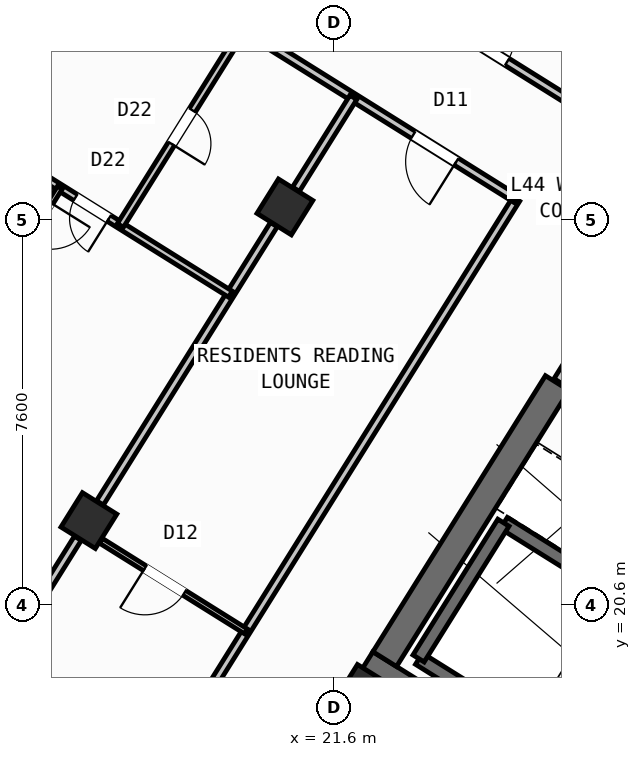
"""IFC4 building model, lengths in metres.
Left out: names, types, materials, properties, quantities, classifications, styles, units other than length and angle.
Written with IfcOpenShell. Run it as: python <this file> out.ifc"""

import sys

from ifc_helpers import new_model, si_unit, direction, frame, frame_2d, origin, origin_2d, place, context, subcontext, project, spatial, rectangle, hollow_rectangle, extrude, source, transform, mapped, element, fill, save


model = new_model("IFC4")
c1 = context("Model", 3, precision=1e-05, world=origin(), true_north=direction((0.0, 1.0)))
c2 = subcontext(c1, "Body", "Model", "MODEL_VIEW")
j1 = project(units=[si_unit("LENGTHUNIT", "METRE"), si_unit("PLANEANGLEUNIT", "RADIAN")], contexts=[c1])
p1 = place(None, origin())
s1 = spatial("IfcSite", under=j1, at=p1, CompositionType="ELEMENT")
p2 = place(p1, origin())
s2 = spatial("IfcBuilding", under=s1, at=p2, CompositionType="ELEMENT")
p3 = place(p2, frame((0.0, 0.0, 174.9)))
s3 = spatial("IfcBuildingStorey", under=s2, at=p3, CompositionType="ELEMENT", Elevation=174.9)
p4 = place(p3, frame((33.366, 12.477, 0.0), z_axis=(0.0, 0.0, 1.0), x_axis=(-0.848047359947, 0.529920442413, 0.0)))
e1 = element("IfcWall", 1, at=p4, inside=s3, PredefinedType="SHEAR", context=c2, shape_type="SweptSolid", body=[
    extrude(rectangle(XDim=13.14, YDim=0.55, at=frame_2d((6.57, 0.0))), origin(), (0.0, 0.0, 1.0), 4.22),
])
p5 = place(p3, frame((26.007, 24.976, 0.0), z_axis=(0.0, 0.0, 1.0), x_axis=(-0.529923795287, -0.848045264823, 0.0)))
e2 = element("IfcWall", 2, at=p5, inside=s3, PredefinedType="SHEAR", context=c2, shape_type="SweptSolid", body=[
    extrude(rectangle(XDim=6.425, YDim=0.55, at=frame_2d((3.212, 0.0))), origin(), (0.0, 0.0, 1.0), 4.22),
])
m1 = source(origin(), c2, "Body", "SweptSolid", [
    extrude(hollow_rectangle(XDim=0.8, YDim=0.8, WallThickness=0.032, at=origin_2d()), origin(), (0.0, 0.0, 1.0), 4.5),
])
for number, where, z_axis, x_axis in (
    (3, (22.191, 18.87, 0.0), (0.0, 0.0, 1.0), (-0.848, 0.53, 0.0)),
    (4, (20.632, 28.452, 0.0), (0.0, 0.0, 1.0), (-0.848, 0.53, 0.0)),
    (5, (16.764, 22.261, 0.0), (0.0, 0.0, 1.0), (-0.848, 0.53, 0.0)),
):
    element("IfcColumn", number, at=place(p3, frame(where, z_axis=z_axis, x_axis=x_axis)), inside=s3, PredefinedType="COLUMN", context=c2, shape_type="MappedRepresentation", body=[
        mapped(m1, transform((0.0, 0.0, 0.0), scale=1.0)),
    ])
p6 = place(p3, frame((29.268, 6.429, 0.0), z_axis=(0.0, 0.0, 1.0), x_axis=(-0.848049971435, 0.529916263149, 0.0)))
e6 = element("IfcWall", 6, at=p6, inside=s3, PredefinedType="STANDARD", context=c2, shape_type="SweptSolid", body=[
    extrude(rectangle(XDim=31.588, YDim=0.32, at=frame_2d((15.794, 0.0))), origin(), (0.0, 0.0, 1.0), 4.22),
])
p7 = place(p6, frame((27.641, 0.0, 0.0)))
e7 = element("IfcOpeningElement", 7, at=p7, cuts=e6, PredefinedType="OPENING", context=c2, shape_type="SweptSolid", body=[
    extrude(rectangle(XDim=1.2, YDim=2.15, at=frame_2d((0.6, 1.075))), frame((0.0, 0.17, 0.0), z_axis=(0.0, -1.0, 0.0), x_axis=(1.0, 0.0, 0.0)), (0.0, 0.0, 1.0), 0.34),
])
p8 = place(p6, frame((2.954, 0.0, 0.8)))
e8 = element("IfcOpeningElement", 8, at=p8, cuts=e6, PredefinedType="OPENING", context=c2, shape_type="SweptSolid", body=[
    extrude(rectangle(XDim=2.1, YDim=1.55, at=frame_2d((1.05, 0.775))), frame((0.0, 0.17, 0.0), z_axis=(0.0, -1.0, 0.0), x_axis=(1.0, 0.0, 0.0)), (0.0, 0.0, 1.0), 0.34),
])
p9 = place(p6, frame((8.253, 0.0, 0.8)))
e9 = element("IfcOpeningElement", 9, at=p9, cuts=e6, PredefinedType="OPENING", context=c2, shape_type="SweptSolid", body=[
    extrude(rectangle(XDim=2.1, YDim=1.55, at=frame_2d((1.05, 0.775))), frame((0.0, 0.17, 0.0), z_axis=(0.0, -1.0, 0.0), x_axis=(1.0, 0.0, 0.0)), (0.0, 0.0, 1.0), 0.34),
])
p10 = place(p6, frame((20.2, 0.0, 1.0)))
e10 = element("IfcOpeningElement", 10, at=p10, cuts=e6, PredefinedType="OPENING", context=c2, shape_type="SweptSolid", body=[
    extrude(rectangle(XDim=0.9, YDim=1.25, at=frame_2d((0.45, 0.625))), frame((0.0, 0.17, 0.0), z_axis=(0.0, -1.0, 0.0), x_axis=(1.0, 0.0, 0.0)), (0.0, 0.0, 1.0), 0.34),
])
p11 = place(p3, frame((14.138, 41.825, 0.0), z_axis=(0.0, 0.0, 1.0), x_axis=(0.848046498049, -0.529921821731, 0.0)))
e11 = element("IfcWall", 11, at=p11, inside=s3, PredefinedType="STANDARD", context=c2, shape_type="SweptSolid", body=[
    extrude(rectangle(XDim=31.588, YDim=0.32, at=frame_2d((15.794, 0.0))), origin(), (0.0, 0.0, 1.0), 4.22),
])
p12 = place(p11, frame((3.339, 0.0, 0.0)))
e12 = element("IfcOpeningElement", 12, at=p12, cuts=e11, PredefinedType="OPENING", context=c2, shape_type="SweptSolid", body=[
    extrude(rectangle(XDim=1.05, YDim=2.15, at=frame_2d((0.525, 1.075))), frame((0.0, 0.17, 0.0), z_axis=(0.0, -1.0, 0.0), x_axis=(1.0, 0.0, 0.0)), (0.0, 0.0, 1.0), 0.34),
])
p13 = place(p11, frame((1.819, 0.0, 1.0)))
e13 = element("IfcOpeningElement", 13, at=p13, cuts=e11, PredefinedType="OPENING", context=c2, shape_type="SweptSolid", body=[
    extrude(rectangle(XDim=0.9, YDim=1.25, at=frame_2d((0.45, 0.625))), frame((0.0, 0.17, 0.0), z_axis=(0.0, -1.0, 0.0), x_axis=(1.0, 0.0, 0.0)), (0.0, 0.0, 1.0), 0.34),
])
p14 = place(p11, frame((8.494, 0.0, 0.85)))
e14 = element("IfcOpeningElement", 14, at=p14, cuts=e11, PredefinedType="OPENING", context=c2, shape_type="SweptSolid", body=[
    extrude(rectangle(XDim=1.8, YDim=1.5, at=frame_2d((0.9, 0.75))), frame((0.0, 0.17, 0.0), z_axis=(0.0, -1.0, 0.0), x_axis=(1.0, 0.0, 0.0)), (0.0, 0.0, 1.0), 0.34),
])
p15 = place(p11, frame((14.636, 0.0, 1.0)))
e15 = element("IfcOpeningElement", 15, at=p15, cuts=e11, PredefinedType="OPENING", context=c2, shape_type="SweptSolid", body=[
    extrude(rectangle(XDim=0.9, YDim=1.25, at=frame_2d((0.45, 0.625))), frame((0.0, 0.17, 0.0), z_axis=(0.0, -1.0, 0.0), x_axis=(1.0, 0.0, 0.0)), (0.0, 0.0, 1.0), 0.34),
])
p16 = place(p11, frame((22.456, 0.0, 0.95)))
e16 = element("IfcOpeningElement", 16, at=p16, cuts=e11, PredefinedType="OPENING", context=c2, shape_type="SweptSolid", body=[
    extrude(rectangle(XDim=1.2, YDim=1.4, at=frame_2d((0.6, 0.7))), frame((0.0, 0.17, 0.0), z_axis=(0.0, -1.0, 0.0), x_axis=(1.0, 0.0, 0.0)), (0.0, 0.0, 1.0), 0.34),
])
p17 = place(p11, frame((27.131, 0.0, 0.95)))
e17 = element("IfcOpeningElement", 17, at=p17, cuts=e11, PredefinedType="OPENING", context=c2, shape_type="SweptSolid", body=[
    extrude(rectangle(XDim=1.2, YDim=1.4, at=frame_2d((0.6, 0.7))), frame((0.0, 0.17, 0.0), z_axis=(0.0, -1.0, 0.0), x_axis=(1.0, 0.0, 0.0)), (0.0, 0.0, 1.0), 0.34),
])
p18 = place(p3, frame((29.605, 15.581, 0.0), z_axis=(0.0, 0.0, 1.0), x_axis=(-0.848036911448, 0.529937163087, 0.0)))
e18 = element("IfcWall", 18, at=p18, inside=s3, PredefinedType="SHEAR", context=c2, shape_type="SweptSolid", body=[
    extrude(rectangle(XDim=7.46, YDim=0.26, at=frame_2d((3.73, 0.0))), origin(), (0.0, 0.0, 1.0), 4.22),
])
p19 = place(p3, frame((31.28, 18.261, 0.0), z_axis=(0.0, 0.0, 1.0), x_axis=(-0.848051618787, 0.529913626805, 0.0)))
e19 = element("IfcWall", 19, at=p19, inside=s3, PredefinedType="SHEAR", context=c2, shape_type="SweptSolid", body=[
    extrude(rectangle(XDim=7.46, YDim=0.26, at=frame_2d((3.73, 0.0))), origin(), (0.0, 0.0, 1.0), 4.22),
])
p20 = place(p19, frame((0.36, 0.0, 0.0)))
e20 = element("IfcOpeningElement", 20, at=p20, cuts=e19, PredefinedType="OPENING", context=c2, shape_type="SweptSolid", body=[
    extrude(rectangle(XDim=0.86, YDim=2.05, at=frame_2d((0.43, 1.025))), frame((0.0, 0.14, 0.0), z_axis=(0.0, -1.0, 0.0), x_axis=(1.0, 0.0, 0.0)), (0.0, 0.0, 1.0), 0.28),
])
p21 = place(p3, frame((24.945, 22.22, 0.0), z_axis=(0.0, 0.0, 1.0), x_axis=(-0.529908658664, -0.84805472316, 0.0)))
e21 = element("IfcWall", 21, at=p21, inside=s3, PredefinedType="SHEAR", context=c2, shape_type="SweptSolid", body=[
    extrude(rectangle(XDim=3.16, YDim=0.26, at=frame_2d((1.58, 0.0))), origin(), (0.0, 0.0, 1.0), 4.22),
])
p22 = place(p3, frame((27.596, 27.52, 0.0), z_axis=(0.0, 0.0, 1.0), x_axis=(-0.529865479138, -0.848081702443, 0.0)))
e22 = element("IfcWall", 22, at=p22, inside=s3, PredefinedType="STANDARD", context=c2, shape_type="SweptSolid", body=[
    extrude(rectangle(XDim=2.96, YDim=0.2, at=frame_2d((1.48, 0.0))), origin(), (0.0, 0.0, 1.0), 2.395),
])
p23 = place(p22, frame((1.76, 0.0, 0.0)))
e23 = element("IfcOpeningElement", 23, at=p23, cuts=e22, PredefinedType="OPENING", context=c2, shape_type="SweptSolid", body=[
    extrude(rectangle(XDim=0.86, YDim=2.05, at=frame_2d((0.43, 1.025))), frame((0.0, 0.11, 0.0), z_axis=(0.0, -1.0, 0.0), x_axis=(1.0, 0.0, 0.0)), (0.0, 0.0, 1.0), 0.22),
])
p24 = place(p3, frame((25.198, 28.606, 0.0), z_axis=(0.0, 0.0, 1.0), x_axis=(-0.529921796515, -0.848046513806, 0.0)))
e24 = element("IfcWall", 24, at=p24, inside=s3, PredefinedType="PARTITIONING", context=c2, shape_type="SweptSolid", body=[
    extrude(rectangle(XDim=16.5, YDim=0.16, at=frame_2d((8.25, 0.0))), origin(), (0.0, 0.0, 1.0), 4.21),
])
p25 = place(p3, frame((26.363, 30.472, 0.0), z_axis=(0.0, 0.0, 1.0), x_axis=(-0.848052408131, 0.529912363569, 0.0)))
e25 = element("IfcWall", 25, at=p25, inside=s3, PredefinedType="PARTITIONING", context=c2, shape_type="SweptSolid", body=[
    extrude(rectangle(XDim=16.73, YDim=0.16, at=frame_2d((8.365, 0.0))), origin(), (0.0, 0.0, 1.0), 4.21),
])
p26 = place(p25, frame((1.588, 0.0, 0.0)))
e26 = element("IfcOpeningElement", 26, at=p26, cuts=e25, PredefinedType="OPENING", context=c2, shape_type="SweptSolid", body=[
    extrude(rectangle(XDim=1.0, YDim=2.1, at=frame_2d((0.5, 1.05))), frame((0.0, 0.09, 0.0), z_axis=(0.0, -1.0, 0.0), x_axis=(1.0, 0.0, 0.0)), (0.0, 0.0, 1.0), 0.18),
])
p27 = place(p25, frame((6.685, 0.0, 0.0)))
e27 = element("IfcOpeningElement", 27, at=p27, cuts=e25, PredefinedType="OPENING", context=c2, shape_type="SweptSolid", body=[
    extrude(rectangle(XDim=1.0, YDim=2.1, at=frame_2d((0.5, 1.05))), frame((0.0, 0.09, 0.0), z_axis=(0.0, -1.0, 0.0), x_axis=(1.0, 0.0, 0.0)), (0.0, 0.0, 1.0), 0.18),
])
p28 = place(p25, frame((12.951, 0.0, 0.0)))
e28 = element("IfcOpeningElement", 28, at=p28, cuts=e25, PredefinedType="OPENING", context=c2, shape_type="SweptSolid", body=[
    extrude(rectangle(XDim=1.0, YDim=2.1, at=frame_2d((0.5, 1.05))), frame((0.0, 0.09, 0.0), z_axis=(0.0, -1.0, 0.0), x_axis=(1.0, 0.0, 0.0)), (0.0, 0.0, 1.0), 0.18),
])
p29 = place(p3, frame((25.198, 28.606, 0.0), z_axis=(0.0, 0.0, 1.0), x_axis=(-0.848052408131, 0.529912363569, 0.0)))
e29 = element("IfcWall", 29, at=p29, inside=s3, PredefinedType="PARTITIONING", context=c2, shape_type="SweptSolid", body=[
    extrude(rectangle(XDim=16.73, YDim=0.16, at=frame_2d((8.365, 0.0))), origin(), (0.0, 0.0, 1.0), 4.21),
])
p30 = place(p29, frame((1.395, 0.0, 0.0)))
e30 = element("IfcOpeningElement", 30, at=p30, cuts=e29, PredefinedType="OPENING", context=c2, shape_type="SweptSolid", body=[
    extrude(rectangle(XDim=1.0, YDim=2.1, at=frame_2d((0.5, 1.05))), frame((0.0, 0.09, 0.0), z_axis=(0.0, -1.0, 0.0), x_axis=(1.0, 0.0, 0.0)), (0.0, 0.0, 1.0), 0.18),
])
p31 = place(p29, frame((7.82, 0.0, 0.0)))
e31 = element("IfcOpeningElement", 31, at=p31, cuts=e29, PredefinedType="OPENING", context=c2, shape_type="SweptSolid", body=[
    extrude(rectangle(XDim=1.0, YDim=2.1, at=frame_2d((0.5, 1.05))), frame((0.0, 0.09, 0.0), z_axis=(0.0, -1.0, 0.0), x_axis=(1.0, 0.0, 0.0)), (0.0, 0.0, 1.0), 0.18),
])
p32 = place(p29, frame((14.76, 0.0, 0.0)))
e32 = element("IfcOpeningElement", 32, at=p32, cuts=e29, PredefinedType="OPENING", context=c2, shape_type="SweptSolid", body=[
    extrude(rectangle(XDim=1.0, YDim=2.1, at=frame_2d((0.5, 1.05))), frame((0.0, 0.09, 0.0), z_axis=(0.0, -1.0, 0.0), x_axis=(1.0, 0.0, 0.0)), (0.0, 0.0, 1.0), 0.18),
])
p33 = place(p3, frame((21.983, 30.615, 0.0), z_axis=(0.0, 0.0, 1.0), x_axis=(-0.529978410432, -0.848011134641, 0.0)))
e33 = element("IfcWall", 33, at=p33, inside=s3, PredefinedType="PARTITIONING", context=c2, shape_type="SweptSolid", body=[
    extrude(rectangle(XDim=2.138, YDim=0.16, at=frame_2d((1.069, 0.0))), origin(), (0.0, 0.0, 1.0), 2.395),
])
p34 = place(p3, frame((20.414, 28.103, 0.0), z_axis=(0.0, 0.0, 1.0), x_axis=(-0.529934553702, -0.848038542045, 0.0)))
e34 = element("IfcWall", 34, at=p34, inside=s3, PredefinedType="PARTITIONING", context=c2, shape_type="SweptSolid", body=[
    extrude(rectangle(XDim=6.476, YDim=0.16, at=frame_2d((3.238, 0.0))), origin(), (0.0, 0.0, 1.0), 2.395),
])
p35 = place(p3, frame((16.545, 21.912, 0.0), z_axis=(0.0, 0.0, 1.0), x_axis=(-0.52995106774, -0.848028222291, 0.0)))
e35 = element("IfcWall", 35, at=p35, inside=s3, PredefinedType="PARTITIONING", context=c2, shape_type="SweptSolid", body=[
    extrude(rectangle(XDim=5.501, YDim=0.16, at=frame_2d((2.75, 0.0))), origin(), (0.0, 0.0, 1.0), 4.21),
])
p36 = place(p3, frame((19.865, 20.073, 0.0), z_axis=(0.0, 0.0, 1.0), x_axis=(-0.848055143312, 0.529907986259, 0.0)))
e36 = element("IfcWall", 36, at=p36, inside=s3, PredefinedType="PARTITIONING", context=c2, shape_type="SweptSolid", body=[
    extrude(rectangle(XDim=3.378, YDim=0.11, at=frame_2d((1.689, 0.0))), origin(), (0.0, 0.0, 1.0), 2.395),
])
p37 = place(p36, frame((1.435, 0.0, 0.0)))
e37 = element("IfcOpeningElement", 37, at=p37, cuts=e36, PredefinedType="OPENING", context=c2, shape_type="SweptSolid", body=[
    extrude(rectangle(XDim=0.92, YDim=2.08, at=frame_2d((0.46, 1.04))), frame((0.0, 0.065, 0.0), z_axis=(0.0, -1.0, 0.0), x_axis=(1.0, 0.0, 0.0)), (0.0, 0.0, 1.0), 0.13),
])
p38 = place(p3, frame((19.556, 26.73, 0.0), z_axis=(0.0, 0.0, 1.0), x_axis=(-0.848049732085, 0.529916646191, 0.0)))
e38 = element("IfcWall", 38, at=p38, inside=s3, PredefinedType="PLUMBINGWALL", context=c2, shape_type="SweptSolid", body=[
    extrude(rectangle(XDim=6.4, YDim=0.14, at=frame_2d((3.2, 0.0))), origin(), (0.0, 0.0, 1.0), 4.21),
])
p39 = place(p38, frame((2.824, 0.0, 0.0)))
e39 = element("IfcOpeningElement", 39, at=p39, cuts=e38, PredefinedType="OPENING", context=c2, shape_type="SweptSolid", body=[
    extrude(rectangle(XDim=0.78, YDim=2.05, at=frame_2d((0.39, 1.025))), frame((0.0, 0.08, 0.0), z_axis=(0.0, -1.0, 0.0), x_axis=(1.0, 0.0, 0.0)), (0.0, 0.0, 1.0), 0.16),
])
p40 = place(p3, frame((19.812, 31.971, 0.0), z_axis=(0.0, 0.0, 1.0), x_axis=(-0.529917480809, -0.848049210561, 0.0)))
e40 = element("IfcWall", 40, at=p40, inside=s3, PredefinedType="PLUMBINGWALL", context=c2, shape_type="SweptSolid", body=[
    extrude(rectangle(XDim=4.58, YDim=0.14, at=frame_2d((2.29, 0.0))), origin(), (0.0, 0.0, 1.0), 4.21),
])
p41 = place(p40, frame((1.9, 0.0, 0.0)))
e41 = element("IfcOpeningElement", 41, at=p41, cuts=e40, PredefinedType="OPENING", context=c2, shape_type="SweptSolid", body=[
    extrude(rectangle(XDim=0.78, YDim=2.05, at=frame_2d((0.39, 1.025))), frame((0.0, 0.08, 0.0), z_axis=(0.0, -1.0, 0.0), x_axis=(1.0, 0.0, 0.0)), (0.0, 0.0, 1.0), 0.16),
])
p42 = place(p3, frame((16.191, 28.833, 0.0), z_axis=(0.0, 0.0, 1.0), x_axis=(-0.529921526101, -0.84804668278, 0.0)))
e42 = element("IfcWall", 42, at=p42, inside=s3, PredefinedType="PARTITIONING", context=c2, shape_type="SweptSolid", body=[
    extrude(rectangle(XDim=12.19, YDim=0.11, at=frame_2d((6.095, 0.0))), origin(), (0.0, 0.0, 1.0), 4.21),
])
p43 = place(p42, frame((0.35, 0.0, 0.0)))
e43 = element("IfcOpeningElement", 43, at=p43, cuts=e42, PredefinedType="OPENING", context=c2, shape_type="SweptSolid", body=[
    extrude(rectangle(XDim=0.92, YDim=2.08, at=frame_2d((0.46, 1.04))), frame((0.0, 0.065, 0.0), z_axis=(0.0, -1.0, 0.0), x_axis=(1.0, 0.0, 0.0)), (0.0, 0.0, 1.0), 0.13),
])
m2 = source(origin(), c2, "Body", "SweptSolid", [
    extrude(rectangle(XDim=1.0, YDim=2.1, at=frame_2d((0.5, 1.05))), frame((0.0, 0.025, 0.0), z_axis=(0.0, -1.0, 0.0), x_axis=(1.0, 0.0, 0.0)), (0.0, 0.0, 1.0), 0.05),
])
p44 = place(p30, origin())
e44 = element("IfcDoor", 44, at=p44, inside=s3, OperationType="SINGLE_SWING_LEFT", PredefinedType="DOOR", context=c2, shape_type="MappedRepresentation", body=[
    mapped(m2, transform((0.0, 0.0, 0.0), scale=1.0)),
])
fill(e30, e44)
m3 = source(origin(), c2, "Body", "SweptSolid", [
    extrude(rectangle(XDim=0.92, YDim=2.08, at=frame_2d((0.46, 1.04))), frame((0.0, 0.025, 0.0), z_axis=(0.0, -1.0, 0.0), x_axis=(1.0, 0.0, 0.0)), (0.0, 0.0, 1.0), 0.05),
])
p45 = place(p37, origin())
e45 = element("IfcDoor", 45, at=p45, inside=s3, OperationType="SINGLE_SWING_RIGHT", PredefinedType="DOOR", context=c2, shape_type="MappedRepresentation", body=[
    mapped(m3, transform((0.0, 0.0, 0.0), scale=1.0)),
])
fill(e37, e45)
m4 = source(origin(), c2, "Body", "SweptSolid", [
    extrude(rectangle(XDim=0.78, YDim=2.05, at=frame_2d((0.39, 1.025))), frame((0.0, 0.025, 0.0), z_axis=(0.0, -1.0, 0.0), x_axis=(1.0, 0.0, 0.0)), (0.0, 0.0, 1.0), 0.05),
])
p46 = place(p39, origin())
e46 = element("IfcDoor", 46, at=p46, inside=s3, OperationType="SINGLE_SWING_LEFT", PredefinedType="DOOR", context=c2, shape_type="MappedRepresentation", body=[
    mapped(m4, transform((0.0, 0.0, 0.0), scale=1.0)),
])
fill(e39, e46)
p47 = place(p41, origin())
e47 = element("IfcDoor", 47, at=p47, inside=s3, OperationType="SINGLE_SWING_RIGHT", PredefinedType="DOOR", context=c2, shape_type="MappedRepresentation", body=[
    mapped(m4, transform((0.0, 0.0, 0.0), scale=1.0)),
])
fill(e41, e47)
p48 = place(p26, frame((1.0, 0.0, 0.0), z_axis=(0.0, 0.0, 1.0), x_axis=(-1.0, 0.0, 0.0)))
e48 = element("IfcDoor", 48, at=p48, inside=s3, OperationType="SINGLE_SWING_LEFT", PredefinedType="DOOR", context=c2, shape_type="MappedRepresentation", body=[
    mapped(m2, transform((0.0, 0.0, 0.0), scale=1.0)),
])
fill(e26, e48)
save(model, sys.argv[1])
